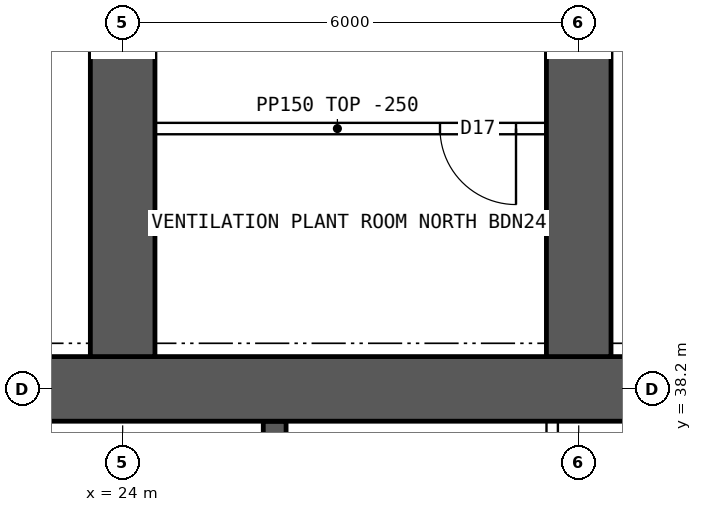
"""IFC4 building model, lengths in metres.
Left out: names, types, materials, properties, quantities, classifications, styles, units other than length and angle.
Written with IfcOpenShell. Run it as: python <this file> out.ifc"""

import sys

from ifc_helpers import new_model, si_unit, direction, frame, frame_2d, origin, place, context, subcontext, project, spatial, rectangle, extrude, element, fill, save


model = new_model("IFC4")
c1 = context("Model", 3, precision=1e-05, world=origin(), true_north=direction((0.0, 1.0)))
c2 = subcontext(c1, "Body", "Model", "MODEL_VIEW")
j1 = project(units=[si_unit("LENGTHUNIT", "METRE"), si_unit("PLANEANGLEUNIT", "RADIAN")], contexts=[c1])
p1 = place(None, origin())
s1 = spatial("IfcSite", under=j1, at=p1, CompositionType="ELEMENT")
p2 = place(p1, origin())
s2 = spatial("IfcBuilding", under=s1, at=p2, CompositionType="ELEMENT")
p3 = place(p2, frame((0.0, 0.0, 186.1)))
s3 = spatial("IfcBuildingStorey", under=s2, at=p3, CompositionType="ELEMENT", Elevation=186.1)
p4 = place(p3, frame((18.0, 38.2, 0.0), z_axis=(0.0, 0.0, 1.0), x_axis=(1.0, 0.0, 0.0)))
e1 = element("IfcWall", 1, at=p4, inside=s3, PredefinedType="SHEAR", context=c2, shape_type="SweptSolid", body=[
    extrude(rectangle(XDim=48.0, YDim=0.85, at=frame_2d((24.0, 0.0))), origin(), (0.0, 0.0, 1.0), 3.75),
])
p5 = place(p3, frame((26.0, 34.75, 0.0), z_axis=(0.0, 0.0, 1.0), x_axis=(0.0, 1.0, 0.0)))
e2 = element("IfcWall", 2, at=p5, inside=s3, PredefinedType="SHEAR", context=c2, shape_type="SweptSolid", body=[
    extrude(rectangle(XDim=3.025, YDim=0.3, at=frame_2d((1.512, 0.0))), origin(), (0.0, 0.0, 1.0), 3.75),
])
for number, where, z_axis, x_axis in (
    (3, (24.0, 38.625, 0.0), (0.0, 0.0, 1.0), (0.0, 1.0, 0.0)),
    (4, (30.0, 38.625, 0.0), (0.0, 0.0, 1.0), (0.0, 1.0, 0.0)),
):
    element("IfcWall", number, at=place(p3, frame(where, z_axis=z_axis, x_axis=x_axis)), inside=s3, PredefinedType="SHEAR", context=c2, shape_type="SweptSolid", body=[
        extrude(rectangle(XDim=8.175, YDim=0.85, at=frame_2d((4.087, 0.0))), origin(), (0.0, 0.0, 1.0), 3.75),
    ])
p6 = place(p3, frame((29.651, 34.75, 0.0), z_axis=(0.0, 0.0, 1.0), x_axis=(0.0, 1.0, 0.0)))
e5 = element("IfcWall", 5, at=p6, inside=s3, PredefinedType="SOLIDWALL", context=c2, shape_type="SweptSolid", body=[
    extrude(rectangle(XDim=3.025, YDim=0.15, at=frame_2d((1.512, 0.0))), origin(), (0.0, 0.0, 1.0), 3.5),
])
p7 = place(p3, frame((29.575, 41.625, 0.0), z_axis=(0.0, 0.0, 1.0), x_axis=(-1.0, 0.0, 0.0)))
e6 = element("IfcWall", 6, at=p7, inside=s3, PredefinedType="PARTITIONING", context=c2, shape_type="SweptSolid", body=[
    extrude(rectangle(XDim=5.5, YDim=0.15, at=frame_2d((2.75, 0.0))), origin(), (0.0, 0.0, 1.0), 3.5),
])
p8 = place(p7, frame((0.4, 0.0, 0.0)))
e7 = element("IfcOpeningElement", 7, at=p8, cuts=e6, PredefinedType="OPENING", context=c2, shape_type="SweptSolid", body=[
    extrude(rectangle(XDim=1.0, YDim=2.1, at=frame_2d((0.5, 1.05))), frame((0.0, 0.085, 0.0), z_axis=(0.0, -1.0, 0.0), x_axis=(1.0, 0.0, 0.0)), (0.0, 0.0, 1.0), 0.17),
])
p9 = place(p8, origin())
e8 = element("IfcDoor", 8, at=p9, inside=s3, OperationType="SINGLE_SWING_LEFT", PredefinedType="DOOR", context=c2, shape_type="SweptSolid", body=[
    extrude(rectangle(XDim=1.0, YDim=2.1, at=frame_2d((0.5, 1.05))), frame((0.0, 0.025, 0.0), z_axis=(0.0, -1.0, 0.0), x_axis=(1.0, 0.0, 0.0)), (0.0, 0.0, 1.0), 0.05),
])
fill(e7, e8)
save(model, sys.argv[1])
